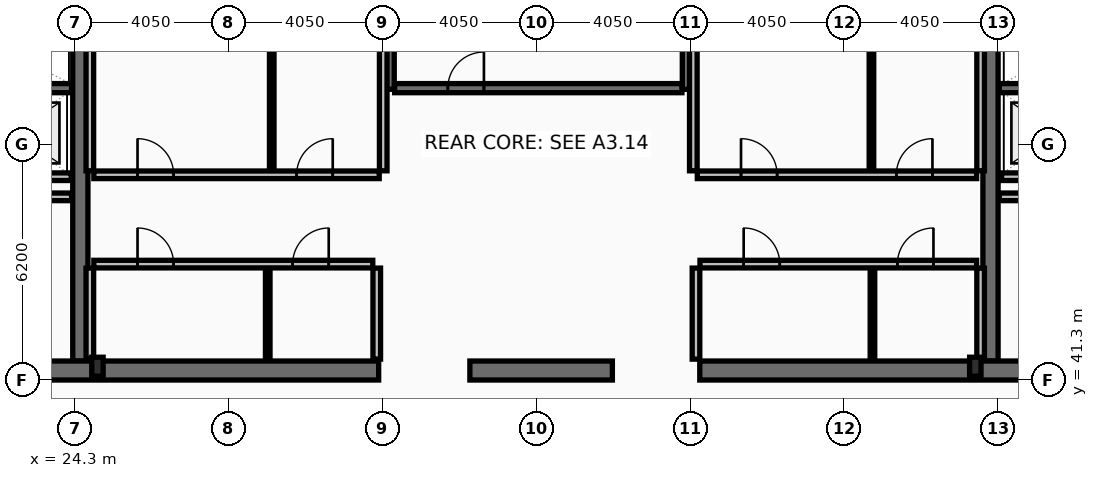
"""IFC4 building model, lengths in metres.
Left out: names, types, materials, properties, quantities, classifications, styles, units other than length and angle.
Written with IfcOpenShell. Run it as: python <this file> out.ifc"""

import sys

from ifc_helpers import new_model, si_unit, direction, frame, frame_2d, origin, origin_2d, place, context, subcontext, project, spatial, rectangle, i_section, extrude, element, fill, save


model = new_model("IFC4")
c1 = context("Model", 3, precision=1e-05, world=origin(), true_north=direction((0.0, 1.0)))
c2 = subcontext(c1, "Body", "Model", "MODEL_VIEW")
j1 = project(units=[si_unit("LENGTHUNIT", "METRE"), si_unit("PLANEANGLEUNIT", "RADIAN")], contexts=[c1])
p1 = place(None, origin())
s1 = spatial("IfcSite", under=j1, at=p1, CompositionType="ELEMENT")
p2 = place(p1, origin())
s2 = spatial("IfcBuilding", under=s1, at=p2, CompositionType="ELEMENT")
p3 = place(p2, frame((0.0, 0.0, 378.6)))
s3 = spatial("IfcBuildingStorey", under=s2, at=p3, CompositionType="ELEMENT", Elevation=378.6)
for number, where, z_axis, x_axis in (
    (1, (24.45, 41.8, 0.0), (0.0, 0.0, 1.0), (0.0, 1.0, 0.0)),
    (2, (48.4, 41.8, 0.0), (0.0, 0.0, 1.0), (0.0, 1.0, 0.0)),
):
    element("IfcWall", number, at=place(p3, frame(where, z_axis=z_axis, x_axis=x_axis)), inside=s3, PredefinedType="SHEAR", context=c2, shape_type="SweptSolid", body=[
        extrude(rectangle(XDim=11.4, YDim=0.4, at=frame_2d((5.7, 0.0))), origin(), (0.0, 0.0, 1.0), 4.0),
    ])
p4 = place(p3, frame((32.3, 41.55, 0.0), z_axis=(0.0, 0.0, 1.0), x_axis=(-1.0, 0.0, 0.0)))
e3 = element("IfcWall", 3, at=p4, inside=s3, PredefinedType="SHEAR", context=c2, shape_type="SweptSolid", body=[
    extrude(rectangle(XDim=11.45, YDim=0.5, at=frame_2d((5.725, 0.0))), origin(), (0.0, 0.0, 1.0), 4.0),
])
p5 = place(p3, frame((38.45, 41.55, 0.0), z_axis=(0.0, 0.0, 1.0), x_axis=(-1.0, 0.0, 0.0)))
e4 = element("IfcWall", 4, at=p5, inside=s3, PredefinedType="SHEAR", context=c2, shape_type="SweptSolid", body=[
    extrude(rectangle(XDim=3.75, YDim=0.5, at=frame_2d((1.875, 0.0))), origin(), (0.0, 0.0, 1.0), 4.0),
])
p6 = place(p3, frame((52.05, 41.55, 0.0), z_axis=(0.0, 0.0, 1.0), x_axis=(-1.0, 0.0, 0.0)))
e5 = element("IfcWall", 5, at=p6, inside=s3, PredefinedType="SHEAR", context=c2, shape_type="SweptSolid", body=[
    extrude(rectangle(XDim=11.3, YDim=0.5, at=frame_2d((5.65, 0.0))), origin(), (0.0, 0.0, 1.0), 4.0),
])
for number, where, z_axis, x_axis in (
    (6, (32.58, 48.95, 0.0), (0.0, 0.0, 1.0), (0.0, 1.0, 0.0)),
    (7, (40.42, 48.95, 0.0), (0.0, 0.0, 1.0), (0.0, 1.0, 0.0)),
):
    element("IfcWall", number, at=place(p3, frame(where, z_axis=z_axis, x_axis=x_axis)), inside=s3, PredefinedType="SHEAR", context=c2, shape_type="SweptSolid", body=[
        extrude(rectangle(XDim=4.25, YDim=0.26, at=frame_2d((2.125, 0.0))), origin(), (0.0, 0.0, 1.0), 4.0),
    ])
p7 = place(p3, frame((16.7, 48.98, 0.0), z_axis=(0.0, 0.0, 1.0), x_axis=(1.0, 0.0, 0.0)))
e8 = element("IfcWall", 8, at=p7, inside=s3, PredefinedType="SHEAR", context=c2, shape_type="SweptSolid", body=[
    extrude(rectangle(XDim=7.52, YDim=0.24, at=frame_2d((3.76, 0.0))), origin(), (0.0, 0.0, 1.0), 4.0),
])
p8 = place(p7, frame((0.22, 0.0, 0.0)))
e9 = element("IfcOpeningElement", 9, at=p8, cuts=e8, PredefinedType="OPENING", context=c2, shape_type="SweptSolid", body=[
    extrude(rectangle(XDim=1.05, YDim=2.15, at=frame_2d((0.525, 1.075))), frame((0.0, 0.13, 0.0), z_axis=(0.0, -1.0, 0.0), x_axis=(1.0, 0.0, 0.0)), (0.0, 0.0, 1.0), 0.26),
])
p9 = place(p3, frame((48.63, 48.98, 0.0), z_axis=(0.0, 0.0, 1.0), x_axis=(1.0, 0.0, 0.0)))
e10 = element("IfcWall", 10, at=p9, inside=s3, PredefinedType="SHEAR", context=c2, shape_type="SweptSolid", body=[
    extrude(rectangle(XDim=7.57, YDim=0.24, at=frame_2d((3.785, 0.0))), origin(), (0.0, 0.0, 1.0), 4.0),
])
p10 = place(p9, frame((6.3, 0.0, 0.0)))
e11 = element("IfcOpeningElement", 11, at=p10, cuts=e10, PredefinedType="OPENING", context=c2, shape_type="SweptSolid", body=[
    extrude(rectangle(XDim=1.05, YDim=2.15, at=frame_2d((0.525, 1.075))), frame((0.0, 0.13, 0.0), z_axis=(0.0, -1.0, 0.0), x_axis=(1.0, 0.0, 0.0)), (0.0, 0.0, 1.0), 0.26),
])
p11 = place(p3, frame((32.72, 48.98, 0.0), z_axis=(0.0, 0.0, 1.0), x_axis=(1.0, 0.0, 0.0)))
e12 = element("IfcWall", 12, at=p11, inside=s3, PredefinedType="SHEAR", context=c2, shape_type="SweptSolid", body=[
    extrude(rectangle(XDim=7.56, YDim=0.24, at=frame_2d((3.78, 0.0))), origin(), (0.0, 0.0, 1.0), 4.0),
])
p12 = place(p11, frame((1.4, 0.0, 0.0)))
e13 = element("IfcOpeningElement", 13, at=p12, cuts=e12, PredefinedType="OPENING", context=c2, shape_type="SweptSolid", body=[
    extrude(rectangle(XDim=0.95, YDim=2.1, at=frame_2d((0.475, 1.05))), frame((0.0, 0.13, 0.0), z_axis=(0.0, -1.0, 0.0), x_axis=(1.0, 0.0, 0.0)), (0.0, 0.0, 1.0), 0.26),
])
for number, where, z_axis, x_axis in (
    (14, (24.9, 41.65, 0.0), (0.0, 0.0, 1.0), (1.0, 0.0, 0.0)),
    (15, (48.0, 41.65, 0.0), (0.0, 0.0, 1.0), (1.0, 0.0, 0.0)),
):
    element("IfcColumn", number, at=place(p3, frame(where, z_axis=z_axis, x_axis=x_axis)), inside=s3, PredefinedType="COLUMN", context=c2, shape_type="SweptSolid", body=[
        extrude(i_section(OverallWidth=0.3, OverallDepth=0.5, WebThickness=0.014, FlangeThickness=0.028, at=origin_2d()), origin(), (0.0, 0.0, 1.0), 5.36),
    ])
p13 = place(p3, frame((51.61, 46.65, 0.0), z_axis=(0.0, 0.0, 1.0), x_axis=(-1.0, 0.0, 0.0)))
e16 = element("IfcWall", 16, at=p13, inside=s3, PredefinedType="PARTITIONING", context=c2, shape_type="SweptSolid", body=[
    extrude(rectangle(XDim=2.92, YDim=0.2, at=frame_2d((1.46, 0.0))), origin(), (0.0, 0.0, 1.0), 4.18),
])
p14 = place(p13, frame((0.86, 0.0, 0.0)))
e17 = element("IfcOpeningElement", 17, at=p14, cuts=e16, PredefinedType="OPENING", context=c2, shape_type="SweptSolid", body=[
    extrude(rectangle(XDim=1.2, YDim=2.18, at=frame_2d((0.6, 1.09))), frame((0.0, 0.11, 0.0), z_axis=(0.0, -1.0, 0.0), x_axis=(1.0, 0.0, 0.0)), (0.0, 0.0, 1.0), 0.22),
])
p15 = place(p3, frame((24.21, 46.65, 0.0), z_axis=(0.0, 0.0, 1.0), x_axis=(-1.0, 0.0, 0.0)))
e18 = element("IfcWall", 18, at=p15, inside=s3, PredefinedType="PARTITIONING", context=c2, shape_type="SweptSolid", body=[
    extrude(rectangle(XDim=2.97, YDim=0.2, at=frame_2d((1.485, 0.0))), origin(), (0.0, 0.0, 1.0), 4.18),
])
p16 = place(p15, frame((0.91, 0.0, 0.0)))
e19 = element("IfcOpeningElement", 19, at=p16, cuts=e18, PredefinedType="OPENING", context=c2, shape_type="SweptSolid", body=[
    extrude(rectangle(XDim=1.2, YDim=2.18, at=frame_2d((0.6, 1.09))), frame((0.0, 0.11, 0.0), z_axis=(0.0, -1.0, 0.0), x_axis=(1.0, 0.0, 0.0)), (0.0, 0.0, 1.0), 0.22),
])
p17 = place(p3, frame((21.2, 46.12, 0.0), z_axis=(0.0, 0.0, 1.0), x_axis=(1.0, 0.0, 0.0)))
e20 = element("IfcWall", 20, at=p17, inside=s3, PredefinedType="PARTITIONING", context=c2, shape_type="SweptSolid", body=[
    extrude(rectangle(XDim=3.02, YDim=0.2, at=frame_2d((1.51, 0.0))), origin(), (0.0, 0.0, 1.0), 4.18),
])
p18 = place(p3, frame((48.63, 46.12, 0.0), z_axis=(0.0, 0.0, 1.0), x_axis=(1.0, 0.0, 0.0)))
e21 = element("IfcWall", 21, at=p18, inside=s3, PredefinedType="PARTITIONING", context=c2, shape_type="SweptSolid", body=[
    extrude(rectangle(XDim=3.07, YDim=0.2, at=frame_2d((1.535, 0.0))), origin(), (0.0, 0.0, 1.0), 4.18),
])
for number, where, z_axis, x_axis in (
    (22, (24.7, 46.805, 0.0), (0.0, 0.0, 1.0), (0.0, 1.0, 0.0)),
    (23, (32.42, 46.805, 0.0), (0.0, 0.0, 1.0), (0.0, 1.0, 0.0)),
):
    element("IfcWall", number, at=place(p3, frame(where, z_axis=z_axis, x_axis=x_axis)), inside=s3, PredefinedType="PARTITIONING", context=c2, shape_type="SweptSolid", body=[
        extrude(rectangle(XDim=5.99, YDim=0.2, at=frame_2d((2.995, 0.0))), origin(), (0.0, 0.0, 1.0), 4.18),
    ])
p19 = place(p3, frame((29.486, 46.805, 0.0), z_axis=(0.0, 0.0, 1.0), x_axis=(0.0, 1.0, 0.0)))
e24 = element("IfcWall", 24, at=p19, inside=s3, PredefinedType="PARTITIONING", context=c2, shape_type="SweptSolid", body=[
    extrude(rectangle(XDim=5.99, YDim=0.12, at=frame_2d((2.995, 0.0))), origin(), (0.0, 0.0, 1.0), 4.18),
])
p20 = place(p3, frame((24.805, 46.7, 0.0), z_axis=(0.0, 0.0, 1.0), x_axis=(1.0, 0.0, 0.0)))
e25 = element("IfcWall", 25, at=p20, inside=s3, PredefinedType="PARTITIONING", context=c2, shape_type="SweptSolid", body=[
    extrude(rectangle(XDim=7.51, YDim=0.2, at=frame_2d((3.755, 0.0))), origin(), (0.0, 0.0, 1.0), 4.18),
])
p21 = place(p20, frame((1.15, 0.0, 0.0)))
e26 = element("IfcOpeningElement", 26, at=p21, cuts=e25, PredefinedType="OPENING", context=c2, shape_type="SweptSolid", body=[
    extrude(rectangle(XDim=0.95, YDim=2.1, at=frame_2d((0.475, 1.05))), frame((0.0, 0.11, 0.0), z_axis=(0.0, -1.0, 0.0), x_axis=(1.0, 0.0, 0.0)), (0.0, 0.0, 1.0), 0.22),
])
p22 = place(p20, frame((5.336, 0.0, 0.0)))
e27 = element("IfcOpeningElement", 27, at=p22, cuts=e25, PredefinedType="OPENING", context=c2, shape_type="SweptSolid", body=[
    extrude(rectangle(XDim=0.95, YDim=2.1, at=frame_2d((0.475, 1.05))), frame((0.0, 0.11, 0.0), z_axis=(0.0, -1.0, 0.0), x_axis=(1.0, 0.0, 0.0)), (0.0, 0.0, 1.0), 0.22),
])
for number, where, z_axis, x_axis in (
    (28, (24.7, 41.85, 0.0), (0.0, 0.0, 1.0), (0.0, 1.0, 0.0)),
    (29, (32.25, 41.85, 0.0), (0.0, 0.0, 1.0), (0.0, 1.0, 0.0)),
):
    element("IfcWall", number, at=place(p3, frame(where, z_axis=z_axis, x_axis=x_axis)), inside=s3, PredefinedType="PARTITIONING", context=c2, shape_type="SweptSolid", body=[
        extrude(rectangle(XDim=2.395, YDim=0.2, at=frame_2d((1.198, 0.0))), origin(), (0.0, 0.0, 1.0), 4.18),
    ])
p23 = place(p3, frame((29.381, 41.85, 0.0), z_axis=(0.0, 0.0, 1.0), x_axis=(0.0, 1.0, 0.0)))
e30 = element("IfcWall", 30, at=p23, inside=s3, PredefinedType="PARTITIONING", context=c2, shape_type="SweptSolid", body=[
    extrude(rectangle(XDim=2.395, YDim=0.12, at=frame_2d((1.198, 0.0))), origin(), (0.0, 0.0, 1.0), 4.18),
])
p24 = place(p3, frame((24.805, 44.35, 0.0), z_axis=(0.0, 0.0, 1.0), x_axis=(1.0, 0.0, 0.0)))
e31 = element("IfcWall", 31, at=p24, inside=s3, PredefinedType="PARTITIONING", context=c2, shape_type="SweptSolid", body=[
    extrude(rectangle(XDim=7.34, YDim=0.2, at=frame_2d((3.67, 0.0))), origin(), (0.0, 0.0, 1.0), 4.18),
])
p25 = place(p24, frame((1.15, 0.0, 0.0)))
e32 = element("IfcOpeningElement", 32, at=p25, cuts=e31, PredefinedType="OPENING", context=c2, shape_type="SweptSolid", body=[
    extrude(rectangle(XDim=0.95, YDim=2.1, at=frame_2d((0.475, 1.05))), frame((0.0, 0.11, 0.0), z_axis=(0.0, -1.0, 0.0), x_axis=(1.0, 0.0, 0.0)), (0.0, 0.0, 1.0), 0.22),
])
p26 = place(p24, frame((5.231, 0.0, 0.0)))
e33 = element("IfcOpeningElement", 33, at=p26, cuts=e31, PredefinedType="OPENING", context=c2, shape_type="SweptSolid", body=[
    extrude(rectangle(XDim=0.95, YDim=2.1, at=frame_2d((0.475, 1.05))), frame((0.0, 0.11, 0.0), z_axis=(0.0, -1.0, 0.0), x_axis=(1.0, 0.0, 0.0)), (0.0, 0.0, 1.0), 0.22),
])
for number, where, z_axis, x_axis in (
    (34, (40.58, 46.805, 0.0), (0.0, 0.0, 1.0), (0.0, 1.0, 0.0)),
    (35, (48.14, 46.805, 0.0), (0.0, 0.0, 1.0), (0.0, 1.0, 0.0)),
):
    element("IfcWall", number, at=place(p3, frame(where, z_axis=z_axis, x_axis=x_axis)), inside=s3, PredefinedType="PARTITIONING", context=c2, shape_type="SweptSolid", body=[
        extrude(rectangle(XDim=5.99, YDim=0.2, at=frame_2d((2.995, 0.0))), origin(), (0.0, 0.0, 1.0), 4.18),
    ])
p27 = place(p3, frame((45.267, 46.805, 0.0), z_axis=(0.0, 0.0, 1.0), x_axis=(0.0, 1.0, 0.0)))
e36 = element("IfcWall", 36, at=p27, inside=s3, PredefinedType="PARTITIONING", context=c2, shape_type="SweptSolid", body=[
    extrude(rectangle(XDim=5.99, YDim=0.12, at=frame_2d((2.995, 0.0))), origin(), (0.0, 0.0, 1.0), 4.18),
])
p28 = place(p3, frame((40.685, 46.7, 0.0), z_axis=(0.0, 0.0, 1.0), x_axis=(1.0, 0.0, 0.0)))
e37 = element("IfcWall", 37, at=p28, inside=s3, PredefinedType="PARTITIONING", context=c2, shape_type="SweptSolid", body=[
    extrude(rectangle(XDim=7.35, YDim=0.2, at=frame_2d((3.675, 0.0))), origin(), (0.0, 0.0, 1.0), 4.18),
])
p29 = place(p28, frame((1.15, 0.0, 0.0)))
e38 = element("IfcOpeningElement", 38, at=p29, cuts=e37, PredefinedType="OPENING", context=c2, shape_type="SweptSolid", body=[
    extrude(rectangle(XDim=0.95, YDim=2.1, at=frame_2d((0.475, 1.05))), frame((0.0, 0.11, 0.0), z_axis=(0.0, -1.0, 0.0), x_axis=(1.0, 0.0, 0.0)), (0.0, 0.0, 1.0), 0.22),
])
p30 = place(p28, frame((5.237, 0.0, 0.0)))
e39 = element("IfcOpeningElement", 39, at=p30, cuts=e37, PredefinedType="OPENING", context=c2, shape_type="SweptSolid", body=[
    extrude(rectangle(XDim=0.95, YDim=2.1, at=frame_2d((0.475, 1.05))), frame((0.0, 0.11, 0.0), z_axis=(0.0, -1.0, 0.0), x_axis=(1.0, 0.0, 0.0)), (0.0, 0.0, 1.0), 0.22),
])
for number, where, z_axis, x_axis in (
    (40, (40.65, 41.85, 0.0), (0.0, 0.0, 1.0), (0.0, 1.0, 0.0)),
    (41, (48.14, 41.85, 0.0), (0.0, 0.0, 1.0), (0.0, 1.0, 0.0)),
):
    element("IfcWall", number, at=place(p3, frame(where, z_axis=z_axis, x_axis=x_axis)), inside=s3, PredefinedType="PARTITIONING", context=c2, shape_type="SweptSolid", body=[
        extrude(rectangle(XDim=2.395, YDim=0.2, at=frame_2d((1.198, 0.0))), origin(), (0.0, 0.0, 1.0), 4.18),
    ])
p31 = place(p3, frame((45.294, 41.85, 0.0), z_axis=(0.0, 0.0, 1.0), x_axis=(0.0, 1.0, 0.0)))
e42 = element("IfcWall", 42, at=p31, inside=s3, PredefinedType="PARTITIONING", context=c2, shape_type="SweptSolid", body=[
    extrude(rectangle(XDim=2.395, YDim=0.12, at=frame_2d((1.198, 0.0))), origin(), (0.0, 0.0, 1.0), 4.18),
])
p32 = place(p3, frame((40.755, 44.35, 0.0), z_axis=(0.0, 0.0, 1.0), x_axis=(1.0, 0.0, 0.0)))
e43 = element("IfcWall", 43, at=p32, inside=s3, PredefinedType="PARTITIONING", context=c2, shape_type="SweptSolid", body=[
    extrude(rectangle(XDim=7.28, YDim=0.2, at=frame_2d((3.64, 0.0))), origin(), (0.0, 0.0, 1.0), 4.18),
])
p33 = place(p32, frame((1.15, 0.0, 0.0)))
e44 = element("IfcOpeningElement", 44, at=p33, cuts=e43, PredefinedType="OPENING", context=c2, shape_type="SweptSolid", body=[
    extrude(rectangle(XDim=0.95, YDim=2.1, at=frame_2d((0.475, 1.05))), frame((0.0, 0.11, 0.0), z_axis=(0.0, -1.0, 0.0), x_axis=(1.0, 0.0, 0.0)), (0.0, 0.0, 1.0), 0.22),
])
p34 = place(p32, frame((5.194, 0.0, 0.0)))
e45 = element("IfcOpeningElement", 45, at=p34, cuts=e43, PredefinedType="OPENING", context=c2, shape_type="SweptSolid", body=[
    extrude(rectangle(XDim=0.95, YDim=2.1, at=frame_2d((0.475, 1.05))), frame((0.0, 0.11, 0.0), z_axis=(0.0, -1.0, 0.0), x_axis=(1.0, 0.0, 0.0)), (0.0, 0.0, 1.0), 0.22),
])
p35 = place(p12, origin())
e46 = element("IfcDoor", 46, at=p35, inside=s3, OperationType="SINGLE_SWING_RIGHT", PredefinedType="DOOR", context=c2, shape_type="SweptSolid", body=[
    extrude(rectangle(XDim=0.95, YDim=2.1, at=frame_2d((0.475, 1.05))), frame((0.0, 0.025, 0.0), z_axis=(0.0, -1.0, 0.0), x_axis=(1.0, 0.0, 0.0)), (0.0, 0.0, 1.0), 0.05),
])
fill(e13, e46)
p36 = place(p21, origin())
e47 = element("IfcDoor", 47, at=p36, inside=s3, OperationType="SINGLE_SWING_LEFT", PredefinedType="DOOR", context=c2, shape_type="SweptSolid", body=[
    extrude(rectangle(XDim=0.95, YDim=2.1, at=frame_2d((0.475, 1.05))), frame((0.0, 0.025, 0.0), z_axis=(0.0, -1.0, 0.0), x_axis=(1.0, 0.0, 0.0)), (0.0, 0.0, 1.0), 0.05),
])
fill(e26, e47)
p37 = place(p22, origin())
e48 = element("IfcDoor", 48, at=p37, inside=s3, OperationType="SINGLE_SWING_RIGHT", PredefinedType="DOOR", context=c2, shape_type="SweptSolid", body=[
    extrude(rectangle(XDim=0.95, YDim=2.1, at=frame_2d((0.475, 1.05))), frame((0.0, 0.025, 0.0), z_axis=(0.0, -1.0, 0.0), x_axis=(1.0, 0.0, 0.0)), (0.0, 0.0, 1.0), 0.05),
])
fill(e27, e48)
p38 = place(p25, origin())
e49 = element("IfcDoor", 49, at=p38, inside=s3, OperationType="SINGLE_SWING_LEFT", PredefinedType="DOOR", context=c2, shape_type="SweptSolid", body=[
    extrude(rectangle(XDim=0.95, YDim=2.1, at=frame_2d((0.475, 1.05))), frame((0.0, 0.025, 0.0), z_axis=(0.0, -1.0, 0.0), x_axis=(1.0, 0.0, 0.0)), (0.0, 0.0, 1.0), 0.05),
])
fill(e32, e49)
p39 = place(p26, origin())
e50 = element("IfcDoor", 50, at=p39, inside=s3, OperationType="SINGLE_SWING_RIGHT", PredefinedType="DOOR", context=c2, shape_type="SweptSolid", body=[
    extrude(rectangle(XDim=0.95, YDim=2.1, at=frame_2d((0.475, 1.05))), frame((0.0, 0.025, 0.0), z_axis=(0.0, -1.0, 0.0), x_axis=(1.0, 0.0, 0.0)), (0.0, 0.0, 1.0), 0.05),
])
fill(e33, e50)
p40 = place(p29, origin())
e51 = element("IfcDoor", 51, at=p40, inside=s3, OperationType="SINGLE_SWING_LEFT", PredefinedType="DOOR", context=c2, shape_type="SweptSolid", body=[
    extrude(rectangle(XDim=0.95, YDim=2.1, at=frame_2d((0.475, 1.05))), frame((0.0, 0.025, 0.0), z_axis=(0.0, -1.0, 0.0), x_axis=(1.0, 0.0, 0.0)), (0.0, 0.0, 1.0), 0.05),
])
fill(e38, e51)
p41 = place(p30, origin())
e52 = element("IfcDoor", 52, at=p41, inside=s3, OperationType="SINGLE_SWING_RIGHT", PredefinedType="DOOR", context=c2, shape_type="SweptSolid", body=[
    extrude(rectangle(XDim=0.95, YDim=2.1, at=frame_2d((0.475, 1.05))), frame((0.0, 0.025, 0.0), z_axis=(0.0, -1.0, 0.0), x_axis=(1.0, 0.0, 0.0)), (0.0, 0.0, 1.0), 0.05),
])
fill(e39, e52)
p42 = place(p33, origin())
e53 = element("IfcDoor", 53, at=p42, inside=s3, OperationType="SINGLE_SWING_LEFT", PredefinedType="DOOR", context=c2, shape_type="SweptSolid", body=[
    extrude(rectangle(XDim=0.95, YDim=2.1, at=frame_2d((0.475, 1.05))), frame((0.0, 0.025, 0.0), z_axis=(0.0, -1.0, 0.0), x_axis=(1.0, 0.0, 0.0)), (0.0, 0.0, 1.0), 0.05),
])
fill(e44, e53)
p43 = place(p34, origin())
e54 = element("IfcDoor", 54, at=p43, inside=s3, OperationType="SINGLE_SWING_RIGHT", PredefinedType="DOOR", context=c2, shape_type="SweptSolid", body=[
    extrude(rectangle(XDim=0.95, YDim=2.1, at=frame_2d((0.475, 1.05))), frame((0.0, 0.025, 0.0), z_axis=(0.0, -1.0, 0.0), x_axis=(1.0, 0.0, 0.0)), (0.0, 0.0, 1.0), 0.05),
])
fill(e45, e54)
save(model, sys.argv[1])
